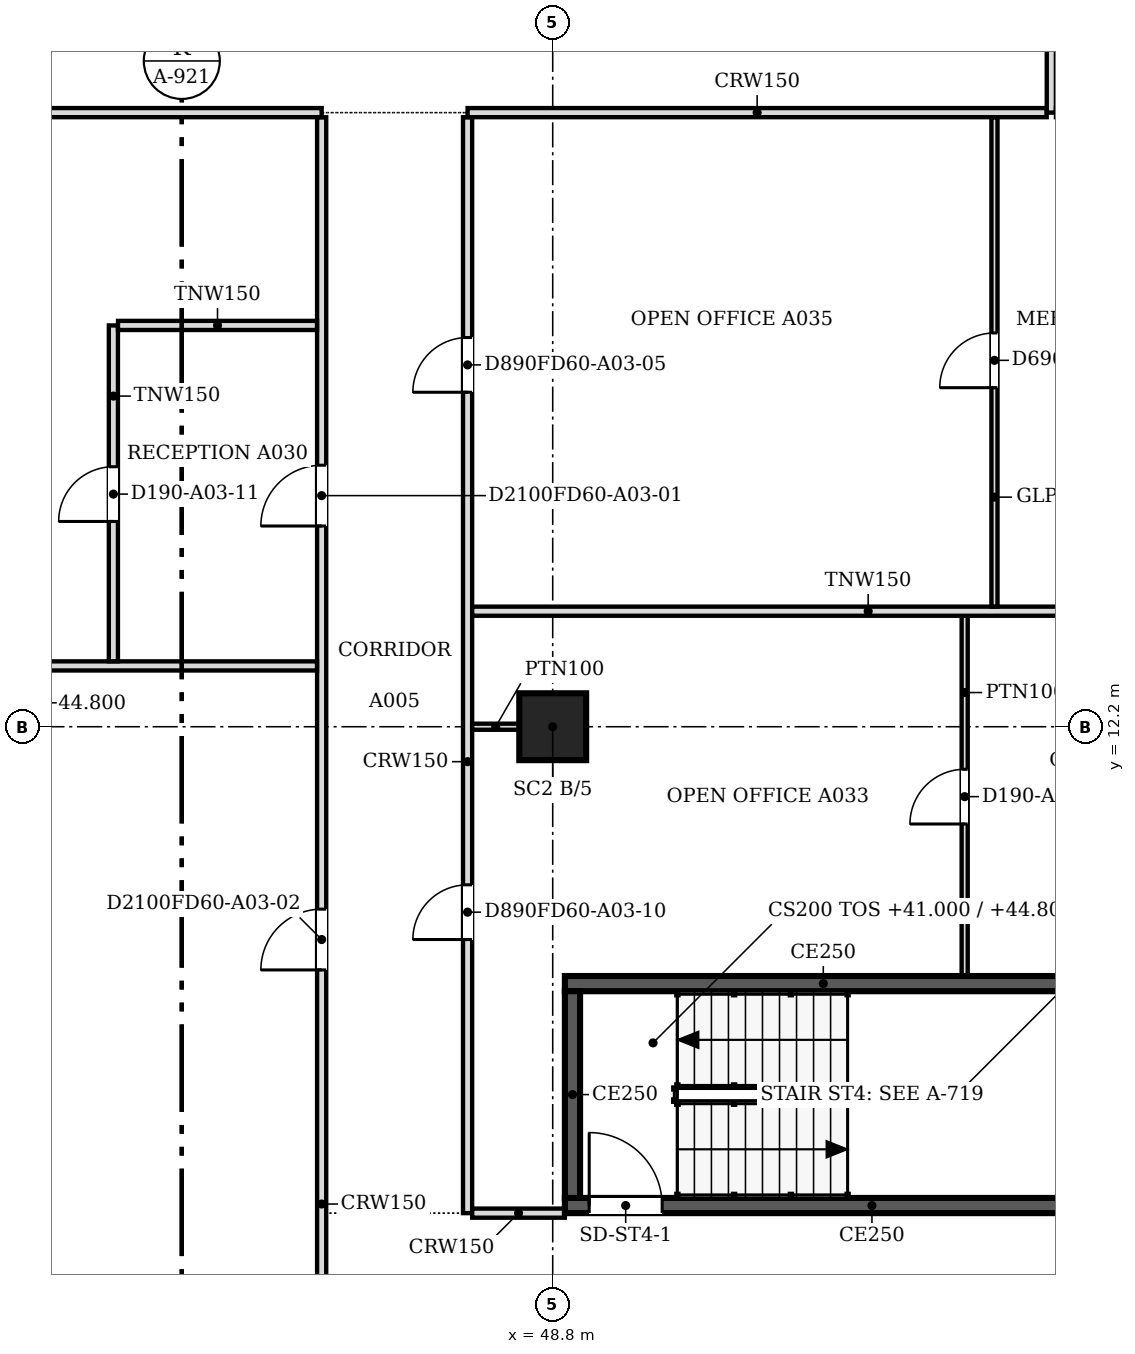
"""IFC4 building model, lengths in metres.
Left out: names, types, materials, properties, quantities, classifications, styles, units other than length and angle.
Written with IfcOpenShell. Run it as: python <this file> out.ifc"""

import sys

from ifc_helpers import new_model, si_unit, direction, frame, frame_2d, origin, origin_2d, place, context, subcontext, project, spatial, rectangle, extrude, source, transform, mapped, element, fill, save


model = new_model("IFC4")
c1 = context("Model", 3, precision=1e-05, world=origin(), true_north=direction((0.0, 1.0)))
c2 = subcontext(c1, "Body", "Model", "MODEL_VIEW")
j1 = project(units=[si_unit("LENGTHUNIT", "METRE"), si_unit("PLANEANGLEUNIT", "RADIAN")], contexts=[c1])
p1 = place(None, origin())
s1 = spatial("IfcSite", under=j1, at=p1, CompositionType="ELEMENT")
p2 = place(p1, origin())
s2 = spatial("IfcBuilding", under=s1, at=p2, CompositionType="ELEMENT")
p3 = place(p2, frame((0.0, 0.0, 41.0)))
s3 = spatial("IfcBuildingStorey", under=s2, at=p3, CompositionType="ELEMENT", Elevation=41.0)
p4 = place(p3, frame((48.8, 12.2, 0.0), z_axis=(0.0, 0.0, 1.0), x_axis=(1.0, 0.0, 0.0)))
e1 = element("IfcColumn", 1, at=p4, inside=s3, PredefinedType="COLUMN", context=c2, shape_type="SweptSolid", body=[
    extrude(rectangle(XDim=1.1, YDim=1.1, at=origin_2d()), origin(), (0.0, 0.0, 1.0), 3.6),
])
p5 = place(p3, frame((57.5, 4.325, 0.0), z_axis=(0.0, 0.0, 1.0), x_axis=(-1.0, 0.0, 0.0)))
e2 = element("IfcWall", 2, at=p5, inside=s3, PredefinedType="SOLIDWALL", context=c2, shape_type="SweptSolid", body=[
    extrude(rectangle(XDim=8.5, YDim=0.25, at=frame_2d((4.25, 0.0))), origin(), (0.0, 0.0, 1.0), 3.8),
])
m1 = source(origin(), c2, "Body", "SweptSolid", [
    extrude(rectangle(XDim=1.2, YDim=2.1, at=frame_2d((0.6, 1.05))), frame((0.0, 0.135, 0.0), z_axis=(0.0, -1.0, 0.0), x_axis=(1.0, 0.0, 0.0)), (0.0, 0.0, 1.0), 0.27),
])
p6 = place(p5, frame((6.9, 0.0, 0.0)))
e3 = element("IfcOpeningElement", 3, at=p6, cuts=e2, PredefinedType="OPENING", context=c2, shape_type="MappedRepresentation", body=[
    mapped(m1, transform((0.0, 0.0, 0.0), scale=1.0)),
])
p7 = place(p3, frame((49.125, 4.45, 0.0), z_axis=(0.0, 0.0, 1.0), x_axis=(0.0, 1.0, 0.0)))
e4 = element("IfcWall", 4, at=p7, inside=s3, PredefinedType="SOLIDWALL", context=c2, shape_type="SweptSolid", body=[
    extrude(rectangle(XDim=3.4, YDim=0.25, at=frame_2d((1.7, 0.0))), origin(), (0.0, 0.0, 1.0), 3.8),
])
p8 = place(p3, frame((49.0, 7.975, 0.0), z_axis=(0.0, 0.0, 1.0), x_axis=(1.0, 0.0, 0.0)))
e5 = element("IfcWall", 5, at=p8, inside=s3, PredefinedType="SOLIDWALL", context=c2, shape_type="SweptSolid", body=[
    extrude(rectangle(XDim=8.5, YDim=0.25, at=frame_2d((4.25, 0.0))), origin(), (0.0, 0.0, 1.0), 3.8),
])
p9 = place(p3, frame((45.0, 0.5, 0.0), z_axis=(0.0, 0.0, 1.0), x_axis=(0.0, 1.0, 0.0)))
e6 = element("IfcWall", 6, at=p9, inside=s3, PredefinedType="PARTITIONING", context=c2, shape_type="SweptSolid", body=[
    extrude(rectangle(XDim=21.724, YDim=0.15, at=frame_2d((10.862, 0.0))), origin(), (0.0, 0.0, 1.0), 3.067),
])
m2 = source(origin(), c2, "Body", "SweptSolid", [
    extrude(rectangle(XDim=1.0, YDim=2.1, at=frame_2d((0.5, 1.05))), frame((0.0, 0.085, 0.0), z_axis=(0.0, -1.0, 0.0), x_axis=(1.0, 0.0, 0.0)), (0.0, 0.0, 1.0), 0.17),
])
p10 = place(p9, frame((15.001, 0.0, 0.0)))
e7 = element("IfcOpeningElement", 7, at=p10, cuts=e6, PredefinedType="OPENING", context=c2, shape_type="MappedRepresentation", body=[
    mapped(m2, transform((0.0, 0.0, 0.0), scale=1.0)),
])
p11 = place(p9, frame((7.7, 0.0, 0.0)))
e8 = element("IfcOpeningElement", 8, at=p11, cuts=e6, PredefinedType="OPENING", context=c2, shape_type="MappedRepresentation", body=[
    mapped(m2, transform((0.0, 0.0, 0.0), scale=1.0)),
])
p12 = place(p3, frame((47.4, 22.224, 0.0), z_axis=(0.0, 0.0, 1.0), x_axis=(0.0, -1.0, 0.0)))
e9 = element("IfcWall", 9, at=p12, inside=s3, PredefinedType="PARTITIONING", context=c2, shape_type="SweptSolid", body=[
    extrude(rectangle(XDim=18.024, YDim=0.15, at=frame_2d((9.012, 0.0))), origin(), (0.0, 0.0, 1.0), 3.067),
])
m3 = source(origin(), c2, "Body", "SweptSolid", [
    extrude(rectangle(XDim=0.9, YDim=2.1, at=frame_2d((0.45, 1.05))), frame((0.0, 0.085, 0.0), z_axis=(0.0, -1.0, 0.0), x_axis=(1.0, 0.0, 0.0)), (0.0, 0.0, 1.0), 0.17),
])
p13 = place(p12, frame((3.623, 0.0, 0.0)))
e10 = element("IfcOpeningElement", 10, at=p13, cuts=e9, PredefinedType="OPENING", context=c2, shape_type="MappedRepresentation", body=[
    mapped(m3, transform((0.0, 0.0, 0.0), scale=1.0)),
])
p14 = place(p12, frame((12.624, 0.0, 0.0)))
e11 = element("IfcOpeningElement", 11, at=p14, cuts=e9, PredefinedType="OPENING", context=c2, shape_type="MappedRepresentation", body=[
    mapped(m3, transform((0.0, 0.0, 0.0), scale=1.0)),
])
p15 = place(p3, frame((47.476, 4.2, 0.0), z_axis=(0.0, 0.0, 1.0), x_axis=(1.0, 0.0, 0.0)))
e12 = element("IfcWall", 12, at=p15, inside=s3, PredefinedType="PARTITIONING", context=c2, shape_type="SweptSolid", body=[
    extrude(rectangle(XDim=1.524, YDim=0.15, at=frame_2d((0.762, 0.0))), origin(), (0.0, 0.0, 1.0), 3.067),
])
p16 = place(p3, frame((55.575, 14.024, 0.0), z_axis=(0.0, 0.0, 1.0), x_axis=(0.0, -1.0, 0.0)))
e13 = element("IfcWall", 13, at=p16, inside=s3, PredefinedType="PARTITIONING", context=c2, shape_type="SweptSolid", body=[
    extrude(rectangle(XDim=5.924, YDim=0.1, at=frame_2d((2.962, 0.0))), origin(), (0.0, 0.0, 1.0), 3.067),
])
m4 = source(origin(), c2, "Body", "SweptSolid", [
    extrude(rectangle(XDim=0.9, YDim=2.1, at=frame_2d((0.45, 1.05))), frame((0.0, 0.06, 0.0), z_axis=(0.0, -1.0, 0.0), x_axis=(1.0, 0.0, 0.0)), (0.0, 0.0, 1.0), 0.12),
])
p17 = place(p16, frame((2.524, 0.0, 0.0)))
e14 = element("IfcOpeningElement", 14, at=p17, cuts=e13, PredefinedType="OPENING", context=c2, shape_type="MappedRepresentation", body=[
    mapped(m4, transform((0.0, 0.0, 0.0), scale=1.0)),
])
p18 = place(p3, frame((48.25, 12.2, 0.0), z_axis=(0.0, 0.0, 1.0), x_axis=(-1.0, 0.0, 0.0)))
e15 = element("IfcWall", 15, at=p18, inside=s3, PredefinedType="PARTITIONING", context=c2, shape_type="SweptSolid", body=[
    extrude(rectangle(XDim=0.775, YDim=0.1, at=frame_2d((0.387, 0.0))), origin(), (0.0, 0.0, 1.0), 3.067),
])
p19 = place(p3, frame((26.351, 13.2, 0.0), z_axis=(0.0, 0.0, 1.0), x_axis=(1.0, 0.0, 0.0)))
e16 = element("IfcWall", 16, at=p19, inside=s3, PredefinedType="PARTITIONING", context=c2, shape_type="SweptSolid", body=[
    extrude(rectangle(XDim=18.573, YDim=0.15, at=frame_2d((9.287, 0.0))), origin(), (0.0, 0.0, 1.0), 3.067),
])
p20 = place(p3, frame((41.575, 13.276, 0.0), z_axis=(0.0, 0.0, 1.0), x_axis=(0.0, 1.0, 0.0)))
e17 = element("IfcWall", 17, at=p20, inside=s3, PredefinedType="PARTITIONING", context=c2, shape_type="SweptSolid", body=[
    extrude(rectangle(XDim=5.524, YDim=0.15, at=frame_2d((2.762, 0.0))), origin(), (0.0, 0.0, 1.0), 3.067),
])
p21 = place(p20, frame((2.3, 0.0, 0.0)))
e18 = element("IfcOpeningElement", 18, at=p21, cuts=e17, PredefinedType="OPENING", context=c2, shape_type="MappedRepresentation", body=[
    mapped(m3, transform((0.0, 0.0, 0.0), scale=1.0)),
])
p22 = place(p3, frame((47.476, 14.1, 0.0), z_axis=(0.0, 0.0, 1.0), x_axis=(1.0, 0.0, 0.0)))
e19 = element("IfcWall", 19, at=p22, inside=s3, PredefinedType="PARTITIONING", context=c2, shape_type="SweptSolid", body=[
    extrude(rectangle(XDim=13.024, YDim=0.15, at=frame_2d((6.512, 0.0))), origin(), (0.0, 0.0, 1.0), 3.067),
])
p23 = place(p3, frame((56.065, 22.224, 0.0), z_axis=(0.0, 0.0, 1.0), x_axis=(0.0, -1.0, 0.0)))
e20 = element("IfcWall", 20, at=p23, inside=s3, PredefinedType="PARTITIONING", context=c2, shape_type="SweptSolid", body=[
    extrude(rectangle(XDim=8.048, YDim=0.1, at=frame_2d((4.024, 0.0))), origin(), (0.0, 0.0, 1.0), 3.067),
])
p24 = place(p23, frame((3.548, 0.0, 0.0)))
e21 = element("IfcOpeningElement", 21, at=p24, cuts=e20, PredefinedType="OPENING", context=c2, shape_type="MappedRepresentation", body=[
    mapped(m4, transform((0.0, 0.0, 0.0), scale=1.0)),
])
p25 = place(p3, frame((41.651, 18.8, 0.0), z_axis=(0.0, 0.0, 1.0), x_axis=(1.0, 0.0, 0.0)))
e22 = element("IfcWall", 22, at=p25, inside=s3, PredefinedType="PARTITIONING", context=c2, shape_type="SweptSolid", body=[
    extrude(rectangle(XDim=3.273, YDim=0.15, at=frame_2d((1.637, 0.0))), origin(), (0.0, 0.0, 1.0), 3.067),
])
p26 = place(p3, frame((30.5, 22.3, 0.0), z_axis=(0.0, 0.0, 1.0), x_axis=(1.0, 0.0, 0.0)))
e23 = element("IfcWall", 23, at=p26, inside=s3, PredefinedType="PARTITIONING", context=c2, shape_type="SweptSolid", body=[
    extrude(rectangle(XDim=14.5, YDim=0.15, at=frame_2d((7.25, 0.0))), origin(), (0.0, 0.0, 1.0), 3.067),
])
p27 = place(p3, frame((47.4, 22.3, 0.0), z_axis=(0.0, 0.0, 1.0), x_axis=(1.0, 0.0, 0.0)))
e24 = element("IfcWall", 24, at=p27, inside=s3, PredefinedType="PARTITIONING", context=c2, shape_type="SweptSolid", body=[
    extrude(rectangle(XDim=9.524, YDim=0.15, at=frame_2d((4.762, 0.0))), origin(), (0.0, 0.0, 1.0), 3.067),
])
p28 = place(p3, frame((57.0, 30.6, 0.0), z_axis=(0.0, 0.0, 1.0), x_axis=(0.0, -1.0, 0.0)))
e25 = element("IfcWall", 25, at=p28, inside=s3, PredefinedType="PARTITIONING", context=c2, shape_type="SweptSolid", body=[
    extrude(rectangle(XDim=8.3, YDim=0.15, at=frame_2d((4.15, 0.0))), origin(), (0.0, 0.0, 1.0), 3.067),
])
p29 = place(p28, frame((3.7, 0.0, 0.0)))
e26 = element("IfcOpeningElement", 26, at=p29, cuts=e25, PredefinedType="OPENING", context=c2, shape_type="MappedRepresentation", body=[
    mapped(m3, transform((0.0, 0.0, 0.0), scale=1.0)),
])
m5 = source(origin(), c2, "Body", "SweptSolid", [
    extrude(rectangle(XDim=1.2, YDim=2.1, at=frame_2d((0.6, 1.05))), frame((0.0, 0.025, 0.0), z_axis=(0.0, -1.0, 0.0), x_axis=(1.0, 0.0, 0.0)), (0.0, 0.0, 1.0), 0.05),
])
p30 = place(p6, origin())
e27 = element("IfcDoor", 27, at=p30, inside=s3, OperationType="SINGLE_SWING_RIGHT", PredefinedType="DOOR", context=c2, shape_type="MappedRepresentation", body=[
    mapped(m5, transform((0.0, 0.0, 0.0), scale=1.0)),
])
fill(e3, e27)
m6 = source(origin(), c2, "Body", "SweptSolid", [
    extrude(rectangle(XDim=1.0, YDim=2.1, at=frame_2d((0.5, 1.05))), frame((0.0, 0.025, 0.0), z_axis=(0.0, -1.0, 0.0), x_axis=(1.0, 0.0, 0.0)), (0.0, 0.0, 1.0), 0.05),
])
p31 = place(p10, origin())
e28 = element("IfcDoor", 28, at=p31, inside=s3, OperationType="SINGLE_SWING_LEFT", PredefinedType="DOOR", context=c2, shape_type="MappedRepresentation", body=[
    mapped(m6, transform((0.0, 0.0, 0.0), scale=1.0)),
])
fill(e7, e28)
m7 = source(origin(), c2, "Body", "SweptSolid", [
    extrude(rectangle(XDim=0.9, YDim=2.1, at=frame_2d((0.45, 1.05))), frame((0.0, 0.025, 0.0), z_axis=(0.0, -1.0, 0.0), x_axis=(1.0, 0.0, 0.0)), (0.0, 0.0, 1.0), 0.05),
])
p32 = place(p17, origin())
e29 = element("IfcDoor", 29, at=p32, inside=s3, OperationType="SINGLE_SWING_RIGHT", PredefinedType="DOOR", context=c2, shape_type="MappedRepresentation", body=[
    mapped(m7, transform((0.0, 0.0, 0.0), scale=1.0)),
])
fill(e14, e29)
p33 = place(p24, origin())
e30 = element("IfcDoor", 30, at=p33, inside=s3, OperationType="SINGLE_SWING_RIGHT", PredefinedType="DOOR", context=c2, shape_type="MappedRepresentation", body=[
    mapped(m7, transform((0.0, 0.0, 0.0), scale=1.0)),
])
fill(e21, e30)
p34 = place(p13, origin())
e31 = element("IfcDoor", 31, at=p34, inside=s3, OperationType="SINGLE_SWING_RIGHT", PredefinedType="DOOR", context=c2, shape_type="MappedRepresentation", body=[
    mapped(m7, transform((0.0, 0.0, 0.0), scale=1.0)),
])
fill(e10, e31)
p35 = place(p21, origin())
e32 = element("IfcDoor", 32, at=p35, inside=s3, OperationType="SINGLE_SWING_LEFT", PredefinedType="DOOR", context=c2, shape_type="MappedRepresentation", body=[
    mapped(m7, transform((0.0, 0.0, 0.0), scale=1.0)),
])
fill(e18, e32)
p36 = place(p11, origin())
e33 = element("IfcDoor", 33, at=p36, inside=s3, OperationType="SINGLE_SWING_LEFT", PredefinedType="DOOR", context=c2, shape_type="MappedRepresentation", body=[
    mapped(m6, transform((0.0, 0.0, 0.0), scale=1.0)),
])
fill(e8, e33)
p37 = place(p14, origin())
e34 = element("IfcDoor", 34, at=p37, inside=s3, OperationType="SINGLE_SWING_RIGHT", PredefinedType="DOOR", context=c2, shape_type="MappedRepresentation", body=[
    mapped(m7, transform((0.0, 0.0, 0.0), scale=1.0)),
])
fill(e11, e34)
save(model, sys.argv[1])
